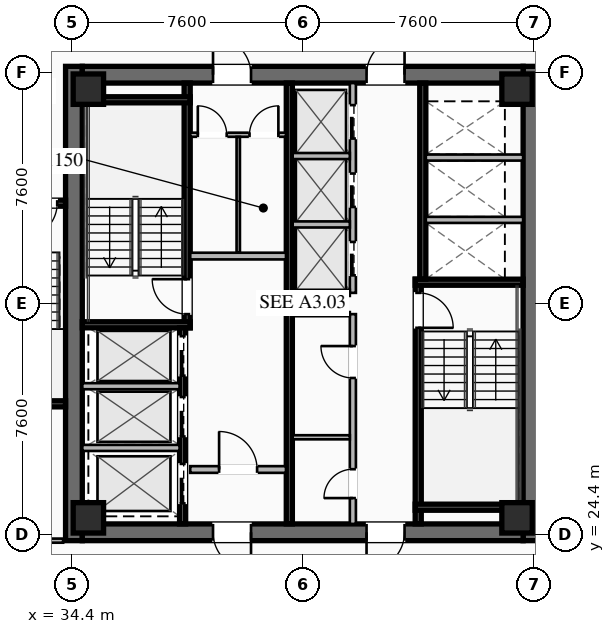
"""IFC4 building model, lengths in metres.
Left out: names, types, materials, properties, quantities, classifications, styles, units other than length and angle.
Written with IfcOpenShell. Run it as: python <this file> out.ifc"""

import sys

from ifc_helpers import new_model, si_unit, direction, frame, frame_2d, origin, origin_2d, place, context, subcontext, project, spatial, rectangle, hollow_rectangle, extrude, element, fill, save


model = new_model("IFC4")
c1 = context("Model", 3, precision=1e-05, world=origin(), true_north=direction((0.0, 1.0)))
c2 = subcontext(c1, "Body", "Model", "MODEL_VIEW")
j1 = project(units=[si_unit("LENGTHUNIT", "METRE"), si_unit("PLANEANGLEUNIT", "RADIAN")], contexts=[c1])
p1 = place(None, origin())
s1 = spatial("IfcSite", under=j1, at=p1, CompositionType="ELEMENT")
p2 = place(p1, origin())
s2 = spatial("IfcBuilding", under=s1, at=p2, CompositionType="ELEMENT")
p3 = place(p2, frame((0.0, 0.0, 139.25)))
s3 = spatial("IfcBuildingStorey", under=s2, at=p3, CompositionType="ELEMENT", Elevation=139.25)
for number, where, z_axis, x_axis in (
    (1, (34.475, 24.2, 0.0), (0.0, 0.0, 1.0), (0.0, 1.0, 0.0)),
    (2, (49.525, 39.8, 0.0), (0.0, 0.0, 1.0), (0.0, -1.0, 0.0)),
):
    element("IfcWall", number, at=place(p3, frame(where, z_axis=z_axis, x_axis=x_axis)), inside=s3, PredefinedType="SHEAR", context=c2, shape_type="SweptSolid", body=[
        extrude(rectangle(XDim=15.6, YDim=0.55, at=frame_2d((7.8, 0.0))), origin(), (0.0, 0.0, 1.0), 3.55),
    ])
p4 = place(p3, frame((49.25, 24.475, 0.0), z_axis=(0.0, 0.0, 1.0), x_axis=(-1.0, 0.0, 0.0)))
e3 = element("IfcWall", 3, at=p4, inside=s3, PredefinedType="SHEAR", context=c2, shape_type="SweptSolid", body=[
    extrude(rectangle(XDim=14.5, YDim=0.55, at=frame_2d((7.25, 0.0))), origin(), (0.0, 0.0, 1.0), 3.55),
])
p5 = place(p4, frame((8.95, 0.0, 0.0)))
e4 = element("IfcOpeningElement", 4, at=p5, cuts=e3, PredefinedType="OPENING", context=c2, shape_type="SweptSolid", body=[
    extrude(rectangle(XDim=1.25, YDim=2.25, at=frame_2d((0.625, 1.125))), frame((0.0, 0.285, 0.0), z_axis=(0.0, -1.0, 0.0), x_axis=(1.0, 0.0, 0.0)), (0.0, 0.0, 1.0), 0.57),
])
p6 = place(p4, frame((3.9, 0.0, 0.0)))
e5 = element("IfcOpeningElement", 5, at=p6, cuts=e3, PredefinedType="OPENING", context=c2, shape_type="SweptSolid", body=[
    extrude(rectangle(XDim=1.25, YDim=2.25, at=frame_2d((0.625, 1.125))), frame((0.0, 0.285, 0.0), z_axis=(0.0, -1.0, 0.0), x_axis=(1.0, 0.0, 0.0)), (0.0, 0.0, 1.0), 0.57),
])
p7 = place(p3, frame((34.75, 39.525, 0.0), z_axis=(0.0, 0.0, 1.0), x_axis=(1.0, 0.0, 0.0)))
e6 = element("IfcWall", 6, at=p7, inside=s3, PredefinedType="SHEAR", context=c2, shape_type="SweptSolid", body=[
    extrude(rectangle(XDim=14.5, YDim=0.55, at=frame_2d((7.25, 0.0))), origin(), (0.0, 0.0, 1.0), 3.55),
])
p8 = place(p7, frame((4.3, 0.0, 0.0)))
e7 = element("IfcOpeningElement", 7, at=p8, cuts=e6, PredefinedType="OPENING", context=c2, shape_type="SweptSolid", body=[
    extrude(rectangle(XDim=1.25, YDim=2.25, at=frame_2d((0.625, 1.125))), frame((0.0, 0.285, 0.0), z_axis=(0.0, -1.0, 0.0), x_axis=(1.0, 0.0, 0.0)), (0.0, 0.0, 1.0), 0.57),
])
p9 = place(p7, frame((9.35, 0.0, 0.0)))
e8 = element("IfcOpeningElement", 8, at=p9, cuts=e6, PredefinedType="OPENING", context=c2, shape_type="SweptSolid", body=[
    extrude(rectangle(XDim=1.25, YDim=2.25, at=frame_2d((0.625, 1.125))), frame((0.0, 0.285, 0.0), z_axis=(0.0, -1.0, 0.0), x_axis=(1.0, 0.0, 0.0)), (0.0, 0.0, 1.0), 0.57),
])
for number, where, z_axis, x_axis in (
    (9, (34.95, 24.95, 0.0), (0.0, 0.0, 1.0), (1.0, 0.0, 0.0)),
    (10, (49.05, 24.95, 0.0), (0.0, 0.0, 1.0), (1.0, 0.0, 0.0)),
    (11, (49.05, 39.05, 0.0), (0.0, 0.0, 1.0), (1.0, 0.0, 0.0)),
    (12, (34.95, 39.05, 0.0), (0.0, 0.0, 1.0), (1.0, 0.0, 0.0)),
):
    element("IfcColumn", number, at=place(p3, frame(where, z_axis=z_axis, x_axis=x_axis)), inside=s3, PredefinedType="COLUMN", context=c2, shape_type="SweptSolid", body=[
        extrude(hollow_rectangle(XDim=1.0, YDim=1.0, WallThickness=0.04, at=origin_2d()), origin(), (0.0, 0.0, 1.0), 3.37),
    ])
p10 = place(p3, frame((38.2, 31.2, 0.0), z_axis=(0.0, 0.0, 1.0), x_axis=(0.0, 1.0, 0.0)))
e13 = element("IfcWall", 13, at=p10, inside=s3, PredefinedType="SHEAR", context=c2, shape_type="SweptSolid", body=[
    extrude(rectangle(XDim=8.05, YDim=0.2, at=frame_2d((4.025, 0.0))), origin(), (0.0, 0.0, 1.0), 3.37),
])
p11 = place(p10, frame((0.45, 0.0, 0.0)))
e14 = element("IfcOpeningElement", 14, at=p11, cuts=e13, PredefinedType="OPENING", context=c2, shape_type="SweptSolid", body=[
    extrude(rectangle(XDim=1.15, YDim=2.2, at=frame_2d((0.575, 1.1))), frame((0.0, 0.11, 0.0), z_axis=(0.0, -1.0, 0.0), x_axis=(1.0, 0.0, 0.0)), (0.0, 0.0, 1.0), 0.22),
])
for number, where, z_axis, x_axis in (
    (15, (34.75, 31.3, 0.0), (0.0, 0.0, 1.0), (1.0, 0.0, 0.0)),
    (16, (34.75, 38.7, 0.0), (0.0, 0.0, 1.0), (1.0, 0.0, 0.0)),
):
    element("IfcWall", number, at=place(p3, frame(where, z_axis=z_axis, x_axis=x_axis)), inside=s3, PredefinedType="SHEAR", context=c2, shape_type="SweptSolid", body=[
        extrude(rectangle(XDim=3.55, YDim=0.2, at=frame_2d((1.775, 0.0))), origin(), (0.0, 0.0, 1.0), 3.37),
    ])
p12 = place(p3, frame((45.8, 32.8, 0.0), z_axis=(0.0, 0.0, 1.0), x_axis=(0.0, -1.0, 0.0)))
e17 = element("IfcWall", 17, at=p12, inside=s3, PredefinedType="SHEAR", context=c2, shape_type="SweptSolid", body=[
    extrude(rectangle(XDim=8.05, YDim=0.2, at=frame_2d((4.025, 0.0))), origin(), (0.0, 0.0, 1.0), 3.37),
])
p13 = place(p12, frame((0.45, 0.0, 0.0)))
e18 = element("IfcOpeningElement", 18, at=p13, cuts=e17, PredefinedType="OPENING", context=c2, shape_type="SweptSolid", body=[
    extrude(rectangle(XDim=1.15, YDim=2.2, at=frame_2d((0.575, 1.1))), frame((0.0, 0.11, 0.0), z_axis=(0.0, -1.0, 0.0), x_axis=(1.0, 0.0, 0.0)), (0.0, 0.0, 1.0), 0.22),
])
for number, where, z_axis, x_axis in (
    (19, (45.7, 32.7, 0.0), (0.0, 0.0, 1.0), (1.0, 0.0, 0.0)),
    (20, (45.7, 25.3, 0.0), (0.0, 0.0, 1.0), (1.0, 0.0, 0.0)),
):
    element("IfcWall", number, at=place(p3, frame(where, z_axis=z_axis, x_axis=x_axis)), inside=s3, PredefinedType="SHEAR", context=c2, shape_type="SweptSolid", body=[
        extrude(rectangle(XDim=3.55, YDim=0.2, at=frame_2d((1.775, 0.0))), origin(), (0.0, 0.0, 1.0), 3.37),
    ])
p14 = place(p3, frame((41.56, 24.75, 0.0), z_axis=(0.0, 0.0, 1.0), x_axis=(0.0, 1.0, 0.0)))
e21 = element("IfcWall", 21, at=p14, inside=s3, PredefinedType="SHEAR", context=c2, shape_type="SweptSolid", body=[
    extrude(rectangle(XDim=14.5, YDim=0.2, at=frame_2d((7.25, 0.0))), origin(), (0.0, 0.0, 1.0), 3.37),
])
p15 = place(p3, frame((38.3, 33.56, 0.0), z_axis=(0.0, 0.0, 1.0), x_axis=(1.0, 0.0, 0.0)))
e22 = element("IfcWall", 22, at=p15, inside=s3, PredefinedType="SOLIDWALL", context=c2, shape_type="SweptSolid", body=[
    extrude(rectangle(XDim=3.15, YDim=0.22, at=frame_2d((1.575, 0.0))), origin(), (0.0, 0.0, 1.0), 2.723),
])
p16 = place(p3, frame((38.3, 26.54, 0.0), z_axis=(0.0, 0.0, 1.0), x_axis=(1.0, 0.0, 0.0)))
e23 = element("IfcWall", 23, at=p16, inside=s3, PredefinedType="SOLIDWALL", context=c2, shape_type="SweptSolid", body=[
    extrude(rectangle(XDim=3.15, YDim=0.22, at=frame_2d((1.575, 0.0))), origin(), (0.0, 0.0, 1.0), 2.723),
])
p17 = place(p16, frame((0.95, 0.0, 0.0)))
e24 = element("IfcOpeningElement", 24, at=p17, cuts=e23, PredefinedType="OPENING", context=c2, shape_type="SweptSolid", body=[
    extrude(rectangle(XDim=1.25, YDim=2.25, at=frame_2d((0.625, 1.125))), frame((0.0, 0.12, 0.0), z_axis=(0.0, -1.0, 0.0), x_axis=(1.0, 0.0, 0.0)), (0.0, 0.0, 1.0), 0.24),
])
p18 = place(p3, frame((38.05, 24.75, 0.0), z_axis=(0.0, 0.0, 1.0), x_axis=(0.0, 1.0, 0.0)))
e25 = element("IfcWall", 25, at=p18, inside=s3, PredefinedType="SHEAR", context=c2, shape_type="SweptSolid", body=[
    extrude(rectangle(XDim=6.45, YDim=0.2, at=frame_2d((3.225, 0.0))), origin(), (0.0, 0.0, 1.0), 3.37),
])
p19 = place(p18, frame((4.875, 0.0, 0.0)))
e26 = element("IfcOpeningElement", 26, at=p19, cuts=e25, PredefinedType="OPENING", context=c2, shape_type="SweptSolid", body=[
    extrude(rectangle(XDim=1.3, YDim=2.25, at=frame_2d((0.65, 1.125))), frame((0.0, 0.11, 0.0), z_axis=(0.0, -1.0, 0.0), x_axis=(1.0, 0.0, 0.0)), (0.0, 0.0, 1.0), 0.22),
])
p20 = place(p18, frame((2.875, 0.0, 0.0)))
e27 = element("IfcOpeningElement", 27, at=p20, cuts=e25, PredefinedType="OPENING", context=c2, shape_type="SweptSolid", body=[
    extrude(rectangle(XDim=1.3, YDim=2.25, at=frame_2d((0.65, 1.125))), frame((0.0, 0.11, 0.0), z_axis=(0.0, -1.0, 0.0), x_axis=(1.0, 0.0, 0.0)), (0.0, 0.0, 1.0), 0.22),
])
p21 = place(p18, frame((0.675, 0.0, 0.0)))
e28 = element("IfcOpeningElement", 28, at=p21, cuts=e25, PredefinedType="OPENING", context=c2, shape_type="SweptSolid", body=[
    extrude(rectangle(XDim=1.3, YDim=2.25, at=frame_2d((0.65, 1.125))), frame((0.0, 0.11, 0.0), z_axis=(0.0, -1.0, 0.0), x_axis=(1.0, 0.0, 0.0)), (0.0, 0.0, 1.0), 0.22),
])
for number, where, z_axis, x_axis in (
    (29, (34.75, 27.25, 0.0), (0.0, 0.0, 1.0), (1.0, 0.0, 0.0)),
    (30, (34.75, 29.28, 0.0), (0.0, 0.0, 1.0), (1.0, 0.0, 0.0)),
):
    element("IfcWall", number, at=place(p3, frame(where, z_axis=z_axis, x_axis=x_axis)), inside=s3, PredefinedType="SOLIDWALL", context=c2, shape_type="SweptSolid", body=[
        extrude(rectangle(XDim=3.2, YDim=0.2, at=frame_2d((1.6, 0.0))), origin(), (0.0, 0.0, 1.0), 3.37),
    ])
p22 = place(p3, frame((45.95, 39.25, 0.0), z_axis=(0.0, 0.0, 1.0), x_axis=(0.0, -1.0, 0.0)))
e31 = element("IfcWall", 31, at=p22, inside=s3, PredefinedType="SHEAR", context=c2, shape_type="SweptSolid", body=[
    extrude(rectangle(XDim=6.45, YDim=0.2, at=frame_2d((3.225, 0.0))), origin(), (0.0, 0.0, 1.0), 3.37),
])
for number, where, z_axis, x_axis in (
    (32, (46.05, 34.75, 0.0), (0.0, 0.0, 1.0), (1.0, 0.0, 0.0)),
    (33, (46.05, 36.8, 0.0), (0.0, 0.0, 1.0), (1.0, 0.0, 0.0)),
):
    element("IfcWall", number, at=place(p3, frame(where, z_axis=z_axis, x_axis=x_axis)), inside=s3, PredefinedType="SOLIDWALL", context=c2, shape_type="SweptSolid", body=[
        extrude(rectangle(XDim=3.2, YDim=0.2, at=frame_2d((1.6, 0.0))), origin(), (0.0, 0.0, 1.0), 3.37),
    ])
p23 = place(p3, frame((38.3, 37.55, 0.0), z_axis=(0.0, 0.0, 1.0), x_axis=(1.0, 0.0, 0.0)))
e34 = element("IfcWall", 34, at=p23, inside=s3, PredefinedType="PARTITIONING", context=c2, shape_type="SweptSolid", body=[
    extrude(rectangle(XDim=3.15, YDim=0.135, at=frame_2d((1.575, 0.0))), origin(), (0.0, 0.0, 1.0), 2.723),
])
p24 = place(p23, frame((0.25, 0.0, 0.0)))
e35 = element("IfcOpeningElement", 35, at=p24, cuts=e34, PredefinedType="OPENING", context=c2, shape_type="SweptSolid", body=[
    extrude(rectangle(XDim=0.95, YDim=2.05, at=frame_2d((0.475, 1.025))), frame((0.0, 0.077, 0.0), z_axis=(0.0, -1.0, 0.0), x_axis=(1.0, 0.0, 0.0)), (0.0, 0.0, 1.0), 0.155),
])
p25 = place(p23, frame((1.95, 0.0, 0.0)))
e36 = element("IfcOpeningElement", 36, at=p25, cuts=e34, PredefinedType="OPENING", context=c2, shape_type="SweptSolid", body=[
    extrude(rectangle(XDim=0.95, YDim=2.05, at=frame_2d((0.475, 1.025))), frame((0.0, 0.077, 0.0), z_axis=(0.0, -1.0, 0.0), x_axis=(1.0, 0.0, 0.0)), (0.0, 0.0, 1.0), 0.155),
])
p26 = place(p3, frame((39.88, 33.68, 0.0), z_axis=(0.0, 0.0, 1.0), x_axis=(0.0, 1.0, 0.0)))
e37 = element("IfcWall", 37, at=p26, inside=s3, PredefinedType="PARTITIONING", context=c2, shape_type="SweptSolid", body=[
    extrude(rectangle(XDim=3.8, YDim=0.11, at=frame_2d((1.9, 0.0))), origin(), (0.0, 0.0, 1.0), 2.723),
])
p27 = place(p3, frame((43.65, 24.75, 0.0), z_axis=(0.0, 0.0, 1.0), x_axis=(0.0, 1.0, 0.0)))
e38 = element("IfcWall", 38, at=p27, inside=s3, PredefinedType="SOLIDWALL", context=c2, shape_type="SweptSolid", body=[
    extrude(rectangle(XDim=6.9, YDim=0.2, at=frame_2d((3.45, 0.0))), origin(), (0.0, 0.0, 1.0), 2.723),
])
p28 = place(p27, frame((0.85, 0.0, 0.0)))
e39 = element("IfcOpeningElement", 39, at=p28, cuts=e38, PredefinedType="OPENING", context=c2, shape_type="SweptSolid", body=[
    extrude(rectangle(XDim=0.95, YDim=2.05, at=frame_2d((0.475, 1.025))), frame((0.0, 0.11, 0.0), z_axis=(0.0, -1.0, 0.0), x_axis=(1.0, 0.0, 0.0)), (0.0, 0.0, 1.0), 0.22),
])
p29 = place(p27, frame((4.8, 0.0, 0.0)))
e40 = element("IfcOpeningElement", 40, at=p29, cuts=e38, PredefinedType="OPENING", context=c2, shape_type="SweptSolid", body=[
    extrude(rectangle(XDim=1.05, YDim=2.2, at=frame_2d((0.525, 1.1))), frame((0.0, 0.11, 0.0), z_axis=(0.0, -1.0, 0.0), x_axis=(1.0, 0.0, 0.0)), (0.0, 0.0, 1.0), 0.22),
])
for number, where, z_axis, x_axis in (
    (41, (41.67, 31.65, 0.0), (0.0, 0.0, 1.0), (1.0, 0.0, 0.0)),
    (42, (41.67, 27.6, 0.0), (0.0, 0.0, 1.0), (1.0, 0.0, 0.0)),
):
    element("IfcWall", number, at=place(p3, frame(where, z_axis=z_axis, x_axis=x_axis)), inside=s3, PredefinedType="PARTITIONING", context=c2, shape_type="SweptSolid", body=[
        extrude(rectangle(XDim=1.88, YDim=0.135, at=frame_2d((0.94, 0.0))), origin(), (0.0, 0.0, 1.0), 2.723),
    ])
p30 = place(p3, frame((43.65, 32.35, 0.0), z_axis=(0.0, 0.0, 1.0), x_axis=(0.0, 1.0, 0.0)))
e43 = element("IfcWall", 43, at=p30, inside=s3, PredefinedType="SOLIDWALL", context=c2, shape_type="SweptSolid", body=[
    extrude(rectangle(XDim=6.9, YDim=0.2, at=frame_2d((3.45, 0.0))), origin(), (0.0, 0.0, 1.0), 3.37),
])
p31 = place(p30, frame((0.575, 0.0, 0.0)))
e44 = element("IfcOpeningElement", 44, at=p31, cuts=e43, PredefinedType="OPENING", context=c2, shape_type="SweptSolid", body=[
    extrude(rectangle(XDim=1.1, YDim=2.2, at=frame_2d((0.55, 1.1))), frame((0.0, 0.11, 0.0), z_axis=(0.0, -1.0, 0.0), x_axis=(1.0, 0.0, 0.0)), (0.0, 0.0, 1.0), 0.22),
])
p32 = place(p30, frame((2.825, 0.0, 0.0)))
e45 = element("IfcOpeningElement", 45, at=p32, cuts=e43, PredefinedType="OPENING", context=c2, shape_type="SweptSolid", body=[
    extrude(rectangle(XDim=1.1, YDim=2.2, at=frame_2d((0.55, 1.1))), frame((0.0, 0.11, 0.0), z_axis=(0.0, -1.0, 0.0), x_axis=(1.0, 0.0, 0.0)), (0.0, 0.0, 1.0), 0.22),
])
p33 = place(p30, frame((5.075, 0.0, 0.0)))
e46 = element("IfcOpeningElement", 46, at=p33, cuts=e43, PredefinedType="OPENING", context=c2, shape_type="SweptSolid", body=[
    extrude(rectangle(XDim=1.1, YDim=2.2, at=frame_2d((0.55, 1.1))), frame((0.0, 0.11, 0.0), z_axis=(0.0, -1.0, 0.0), x_axis=(1.0, 0.0, 0.0)), (0.0, 0.0, 1.0), 0.22),
])
for number, where, z_axis, x_axis in (
    (47, (41.67, 32.35, 0.0), (0.0, 0.0, 1.0), (1.0, 0.0, 0.0)),
    (48, (41.67, 34.6, 0.0), (0.0, 0.0, 1.0), (1.0, 0.0, 0.0)),
    (49, (41.67, 36.85, 0.0), (0.0, 0.0, 1.0), (1.0, 0.0, 0.0)),
):
    element("IfcWall", number, at=place(p3, frame(where, z_axis=z_axis, x_axis=x_axis)), inside=s3, PredefinedType="SOLIDWALL", context=c2, shape_type="SweptSolid", body=[
        extrude(rectangle(XDim=1.88, YDim=0.2, at=frame_2d((0.94, 0.0))), origin(), (0.0, 0.0, 1.0), 3.37),
    ])
p34 = place(p3, frame((34.2, 35.3, 0.0), z_axis=(0.0, 0.0, 1.0), x_axis=(-1.0, 0.0, 0.0)))
e50 = element("IfcWall", 50, at=p34, inside=s3, PredefinedType="SHEAR", context=c2, shape_type="SweptSolid", body=[
    extrude(rectangle(XDim=3.4, YDim=0.2, at=frame_2d((1.7, 0.0))), origin(), (0.0, 0.0, 1.0), 3.37),
])
p35 = place(p34, frame((0.275, 0.0, 0.0)))
e51 = element("IfcOpeningElement", 51, at=p35, cuts=e50, PredefinedType="OPENING", context=c2, shape_type="SweptSolid", body=[
    extrude(rectangle(XDim=1.15, YDim=2.2, at=frame_2d((0.575, 1.1))), frame((0.0, 0.11, 0.0), z_axis=(0.0, -1.0, 0.0), x_axis=(1.0, 0.0, 0.0)), (0.0, 0.0, 1.0), 0.22),
])
p36 = place(p3, frame((30.8, 28.7, 0.0), z_axis=(0.0, 0.0, 1.0), x_axis=(1.0, 0.0, 0.0)))
e52 = element("IfcWall", 52, at=p36, inside=s3, PredefinedType="SHEAR", context=c2, shape_type="SweptSolid", body=[
    extrude(rectangle(XDim=3.4, YDim=0.2, at=frame_2d((1.7, 0.0))), origin(), (0.0, 0.0, 1.0), 3.37),
])
p37 = place(p3, frame((22.72, 24.2, 0.0), z_axis=(0.0, 0.0, 1.0), x_axis=(1.0, 0.0, 0.0)))
e53 = element("IfcWall", 53, at=p37, inside=s3, PredefinedType="PARTITIONING", context=c2, shape_type="SweptSolid", body=[
    extrude(rectangle(XDim=11.4, YDim=0.135, at=frame_2d((5.7, 0.0))), origin(), (0.0, 0.0, 1.0), 2.723),
])
p38 = place(p37, frame((8.405, 0.0, 0.0)))
e54 = element("IfcOpeningElement", 54, at=p38, cuts=e53, PredefinedType="OPENING", context=c2, shape_type="SweptSolid", body=[
    extrude(rectangle(XDim=0.95, YDim=2.05, at=frame_2d((0.475, 1.025))), frame((0.0, 0.077, 0.0), z_axis=(0.0, -1.0, 0.0), x_axis=(1.0, 0.0, 0.0)), (0.0, 0.0, 1.0), 0.155),
])
p39 = place(p8, origin())
e55 = element("IfcDoor", 55, at=p39, inside=s3, OperationType="SINGLE_SWING_LEFT", PredefinedType="DOOR", context=c2, shape_type="SweptSolid", body=[
    extrude(rectangle(XDim=1.25, YDim=2.25, at=frame_2d((0.625, 1.125))), frame((0.0, 0.025, 0.0), z_axis=(0.0, -1.0, 0.0), x_axis=(1.0, 0.0, 0.0)), (0.0, 0.0, 1.0), 0.05),
])
fill(e7, e55)
p40 = place(p9, origin())
e56 = element("IfcDoor", 56, at=p40, inside=s3, OperationType="SINGLE_SWING_RIGHT", PredefinedType="DOOR", context=c2, shape_type="SweptSolid", body=[
    extrude(rectangle(XDim=1.25, YDim=2.25, at=frame_2d((0.625, 1.125))), frame((0.0, 0.025, 0.0), z_axis=(0.0, -1.0, 0.0), x_axis=(1.0, 0.0, 0.0)), (0.0, 0.0, 1.0), 0.05),
])
fill(e8, e56)
p41 = place(p5, origin())
e57 = element("IfcDoor", 57, at=p41, inside=s3, OperationType="SINGLE_SWING_LEFT", PredefinedType="DOOR", context=c2, shape_type="SweptSolid", body=[
    extrude(rectangle(XDim=1.25, YDim=2.25, at=frame_2d((0.625, 1.125))), frame((0.0, 0.025, 0.0), z_axis=(0.0, -1.0, 0.0), x_axis=(1.0, 0.0, 0.0)), (0.0, 0.0, 1.0), 0.05),
])
fill(e4, e57)
p42 = place(p6, origin())
e58 = element("IfcDoor", 58, at=p42, inside=s3, OperationType="SINGLE_SWING_RIGHT", PredefinedType="DOOR", context=c2, shape_type="SweptSolid", body=[
    extrude(rectangle(XDim=1.25, YDim=2.25, at=frame_2d((0.625, 1.125))), frame((0.0, 0.025, 0.0), z_axis=(0.0, -1.0, 0.0), x_axis=(1.0, 0.0, 0.0)), (0.0, 0.0, 1.0), 0.05),
])
fill(e5, e58)
p43 = place(p11, origin())
e59 = element("IfcDoor", 59, at=p43, inside=s3, OperationType="SINGLE_SWING_RIGHT", PredefinedType="DOOR", context=c2, shape_type="SweptSolid", body=[
    extrude(rectangle(XDim=1.15, YDim=2.2, at=frame_2d((0.575, 1.1))), frame((0.0, 0.025, 0.0), z_axis=(0.0, -1.0, 0.0), x_axis=(1.0, 0.0, 0.0)), (0.0, 0.0, 1.0), 0.05),
])
fill(e14, e59)
p44 = place(p13, origin())
e60 = element("IfcDoor", 60, at=p44, inside=s3, OperationType="SINGLE_SWING_RIGHT", PredefinedType="DOOR", context=c2, shape_type="SweptSolid", body=[
    extrude(rectangle(XDim=1.15, YDim=2.2, at=frame_2d((0.575, 1.1))), frame((0.0, 0.025, 0.0), z_axis=(0.0, -1.0, 0.0), x_axis=(1.0, 0.0, 0.0)), (0.0, 0.0, 1.0), 0.05),
])
fill(e18, e60)
p45 = place(p17, origin())
e61 = element("IfcDoor", 61, at=p45, inside=s3, OperationType="SINGLE_SWING_LEFT", PredefinedType="DOOR", context=c2, shape_type="SweptSolid", body=[
    extrude(rectangle(XDim=1.25, YDim=2.25, at=frame_2d((0.625, 1.125))), frame((0.0, 0.025, 0.0), z_axis=(0.0, -1.0, 0.0), x_axis=(1.0, 0.0, 0.0)), (0.0, 0.0, 1.0), 0.05),
])
fill(e24, e61)
p46 = place(p24, origin())
e62 = element("IfcDoor", 62, at=p46, inside=s3, OperationType="SINGLE_SWING_LEFT", PredefinedType="DOOR", context=c2, shape_type="SweptSolid", body=[
    extrude(rectangle(XDim=0.95, YDim=2.05, at=frame_2d((0.475, 1.025))), frame((0.0, 0.025, 0.0), z_axis=(0.0, -1.0, 0.0), x_axis=(1.0, 0.0, 0.0)), (0.0, 0.0, 1.0), 0.05),
])
fill(e35, e62)
p47 = place(p25, origin())
e63 = element("IfcDoor", 63, at=p47, inside=s3, OperationType="SINGLE_SWING_RIGHT", PredefinedType="DOOR", context=c2, shape_type="SweptSolid", body=[
    extrude(rectangle(XDim=0.95, YDim=2.05, at=frame_2d((0.475, 1.025))), frame((0.0, 0.025, 0.0), z_axis=(0.0, -1.0, 0.0), x_axis=(1.0, 0.0, 0.0)), (0.0, 0.0, 1.0), 0.05),
])
fill(e36, e63)
p48 = place(p28, origin())
e64 = element("IfcDoor", 64, at=p48, inside=s3, OperationType="SINGLE_SWING_LEFT", PredefinedType="DOOR", context=c2, shape_type="SweptSolid", body=[
    extrude(rectangle(XDim=0.95, YDim=2.05, at=frame_2d((0.475, 1.025))), frame((0.0, 0.025, 0.0), z_axis=(0.0, -1.0, 0.0), x_axis=(1.0, 0.0, 0.0)), (0.0, 0.0, 1.0), 0.05),
])
fill(e39, e64)
p49 = place(p29, origin())
e65 = element("IfcDoor", 65, at=p49, inside=s3, OperationType="SINGLE_SWING_RIGHT", PredefinedType="DOOR", context=c2, shape_type="SweptSolid", body=[
    extrude(rectangle(XDim=1.05, YDim=2.2, at=frame_2d((0.525, 1.1))), frame((0.0, 0.025, 0.0), z_axis=(0.0, -1.0, 0.0), x_axis=(1.0, 0.0, 0.0)), (0.0, 0.0, 1.0), 0.05),
])
fill(e40, e65)
p50 = place(p35, origin())
e66 = element("IfcDoor", 66, at=p50, inside=s3, OperationType="SINGLE_SWING_RIGHT", PredefinedType="DOOR", context=c2, shape_type="SweptSolid", body=[
    extrude(rectangle(XDim=1.15, YDim=2.2, at=frame_2d((0.575, 1.1))), frame((0.0, 0.025, 0.0), z_axis=(0.0, -1.0, 0.0), x_axis=(1.0, 0.0, 0.0)), (0.0, 0.0, 1.0), 0.05),
])
fill(e51, e66)
p51 = place(p19, origin())
e67 = element("IfcDoor", 67, at=p51, inside=s3, OperationType="SLIDING_TO_LEFT", PredefinedType="DOOR", context=c2, shape_type="SweptSolid", body=[
    extrude(rectangle(XDim=1.3, YDim=2.25, at=frame_2d((0.65, 1.125))), frame((0.0, 0.025, 0.0), z_axis=(0.0, -1.0, 0.0), x_axis=(1.0, 0.0, 0.0)), (0.0, 0.0, 1.0), 0.05),
])
fill(e26, e67)
p52 = place(p20, origin())
e68 = element("IfcDoor", 68, at=p52, inside=s3, OperationType="SLIDING_TO_LEFT", PredefinedType="DOOR", context=c2, shape_type="SweptSolid", body=[
    extrude(rectangle(XDim=1.3, YDim=2.25, at=frame_2d((0.65, 1.125))), frame((0.0, 0.025, 0.0), z_axis=(0.0, -1.0, 0.0), x_axis=(1.0, 0.0, 0.0)), (0.0, 0.0, 1.0), 0.05),
])
fill(e27, e68)
p53 = place(p21, origin())
e69 = element("IfcDoor", 69, at=p53, inside=s3, OperationType="SLIDING_TO_LEFT", PredefinedType="DOOR", context=c2, shape_type="SweptSolid", body=[
    extrude(rectangle(XDim=1.3, YDim=2.25, at=frame_2d((0.65, 1.125))), frame((0.0, 0.025, 0.0), z_axis=(0.0, -1.0, 0.0), x_axis=(1.0, 0.0, 0.0)), (0.0, 0.0, 1.0), 0.05),
])
fill(e28, e69)
p54 = place(p31, origin())
e70 = element("IfcDoor", 70, at=p54, inside=s3, OperationType="SLIDING_TO_LEFT", PredefinedType="DOOR", context=c2, shape_type="SweptSolid", body=[
    extrude(rectangle(XDim=1.1, YDim=2.2, at=frame_2d((0.55, 1.1))), frame((0.0, 0.025, 0.0), z_axis=(0.0, -1.0, 0.0), x_axis=(1.0, 0.0, 0.0)), (0.0, 0.0, 1.0), 0.05),
])
fill(e44, e70)
p55 = place(p32, origin())
e71 = element("IfcDoor", 71, at=p55, inside=s3, OperationType="SLIDING_TO_LEFT", PredefinedType="DOOR", context=c2, shape_type="SweptSolid", body=[
    extrude(rectangle(XDim=1.1, YDim=2.2, at=frame_2d((0.55, 1.1))), frame((0.0, 0.025, 0.0), z_axis=(0.0, -1.0, 0.0), x_axis=(1.0, 0.0, 0.0)), (0.0, 0.0, 1.0), 0.05),
])
fill(e45, e71)
p56 = place(p33, origin())
e72 = element("IfcDoor", 72, at=p56, inside=s3, OperationType="SLIDING_TO_LEFT", PredefinedType="DOOR", context=c2, shape_type="SweptSolid", body=[
    extrude(rectangle(XDim=1.1, YDim=2.2, at=frame_2d((0.55, 1.1))), frame((0.0, 0.025, 0.0), z_axis=(0.0, -1.0, 0.0), x_axis=(1.0, 0.0, 0.0)), (0.0, 0.0, 1.0), 0.05),
])
fill(e46, e72)
save(model, sys.argv[1])
